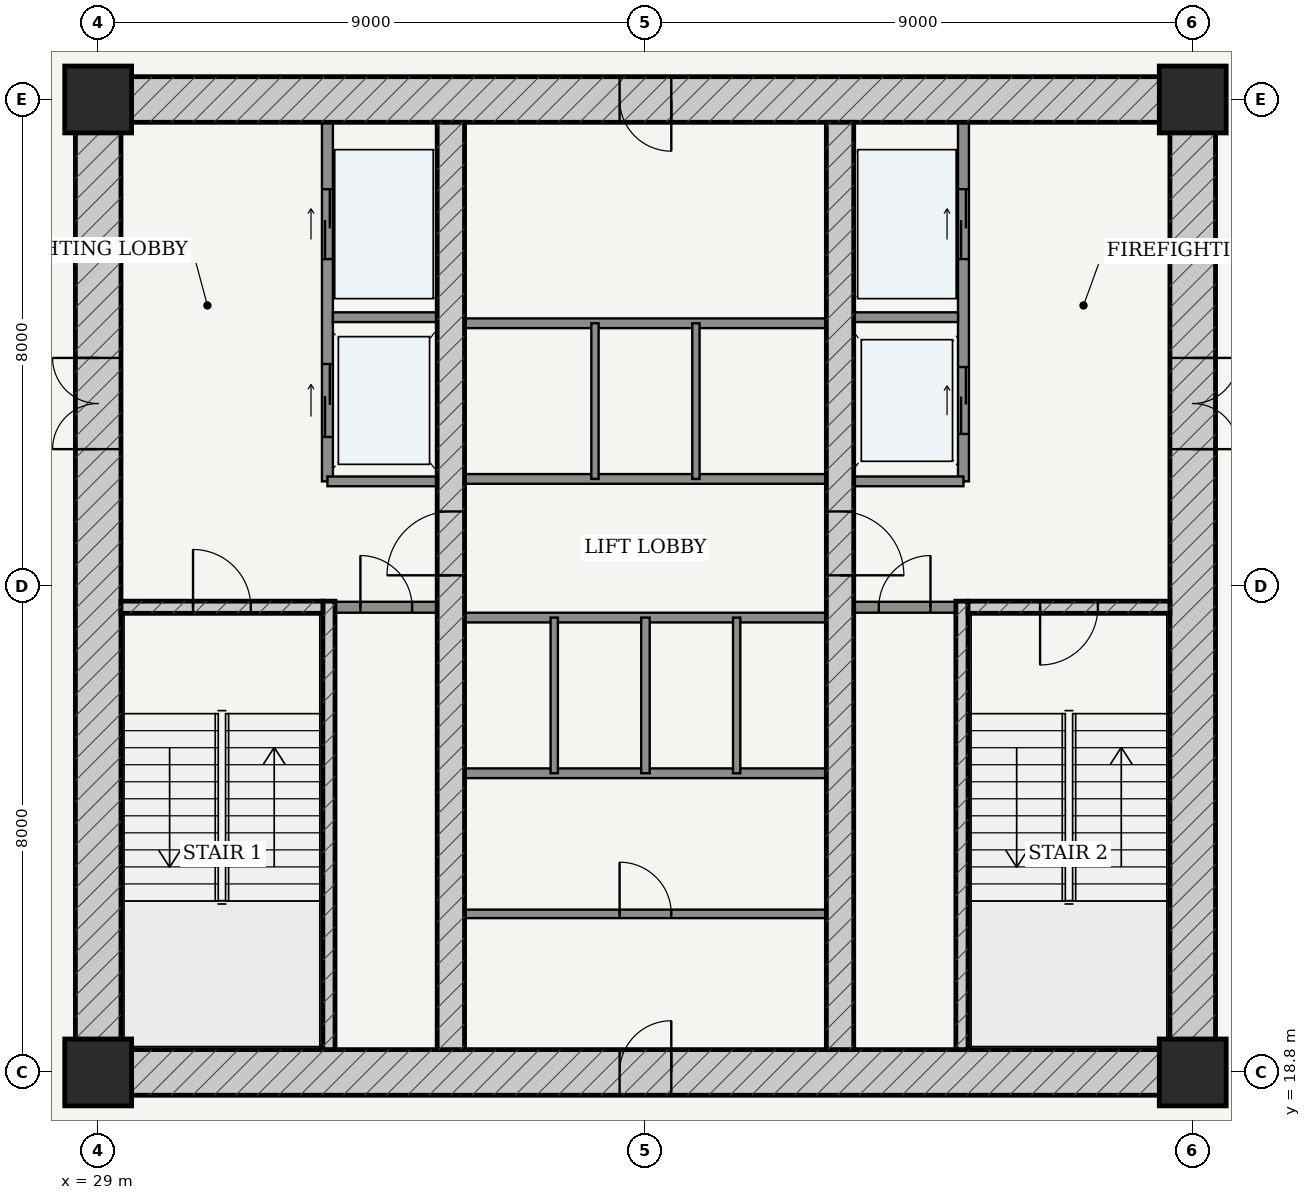
"""IFC4 building model, lengths in metres.
Left out: names, types, materials, properties, quantities, classifications, styles, units other than length and angle.
Written with IfcOpenShell. Run it as: python <this file> out.ifc"""

import sys

from ifc_helpers import new_model, si_unit, direction, frame, frame_2d, origin, origin_2d, place, context, subcontext, project, spatial, rectangle, extrude, source, transform, mapped, element, fill, save


model = new_model("IFC4")
c1 = context("Model", 3, precision=1e-05, world=origin(), true_north=direction((-0.2419218956, 0.970295726276)))
c2 = subcontext(c1, "Body", "Model", "MODEL_VIEW")
j1 = project(units=[si_unit("LENGTHUNIT", "METRE"), si_unit("PLANEANGLEUNIT", "RADIAN")], contexts=[c1])
p1 = place(None, origin())
s1 = spatial("IfcSite", under=j1, at=p1, CompositionType="ELEMENT")
p2 = place(p1, origin())
s2 = spatial("IfcBuilding", under=s1, at=p2, CompositionType="ELEMENT")
p3 = place(p2, frame((0.0, 0.0, -8.4)))
s3 = spatial("IfcBuildingStorey", under=s2, at=p3, CompositionType="ELEMENT", Elevation=-8.4)
for number, where, z_axis, x_axis in (
    (1, (29.0, 18.8, 0.0), (0.0, 0.0, 1.0), (1.0, 0.0, 0.0)),
    (2, (47.0, 18.8, 0.0), (0.0, 0.0, 1.0), (1.0, 0.0, 0.0)),
    (3, (47.0, 34.8, 0.0), (0.0, 0.0, 1.0), (1.0, 0.0, 0.0)),
    (4, (29.0, 34.8, 0.0), (0.0, 0.0, 1.0), (1.0, 0.0, 0.0)),
):
    element("IfcColumn", number, at=place(p3, frame(where, z_axis=z_axis, x_axis=x_axis)), inside=s3, PredefinedType="COLUMN", context=c2, shape_type="SweptSolid", body=[
        extrude(rectangle(XDim=1.1, YDim=1.1, at=origin_2d()), origin(), (0.0, 0.0, 1.0), 4.2),
    ])
p4 = place(p3, frame((28.625, 18.8, 0.0), z_axis=(0.0, 0.0, 1.0), x_axis=(1.0, 0.0, 0.0)))
e5 = element("IfcWall", 5, at=p4, inside=s3, PredefinedType="SHEAR", context=c2, shape_type="SweptSolid", body=[
    extrude(rectangle(XDim=18.75, YDim=0.75, at=frame_2d((9.375, 0.0))), origin(), (0.0, 0.0, 1.0), 3.88),
])
p5 = place(p4, frame((8.95, 0.0, 0.0)))
e6 = element("IfcOpeningElement", 6, at=p5, cuts=e5, PredefinedType="OPENING", context=c2, shape_type="SweptSolid", body=[
    extrude(rectangle(XDim=0.85, YDim=2.1, at=frame_2d((0.425, 1.05))), frame((0.0, 0.385, 0.0), z_axis=(0.0, -1.0, 0.0), x_axis=(1.0, 0.0, 0.0)), (0.0, 0.0, 1.0), 0.77),
])
p6 = place(p3, frame((28.625, 34.8, 0.0), z_axis=(0.0, 0.0, 1.0), x_axis=(1.0, 0.0, 0.0)))
e7 = element("IfcWall", 7, at=p6, inside=s3, PredefinedType="SHEAR", context=c2, shape_type="SweptSolid", body=[
    extrude(rectangle(XDim=18.75, YDim=0.75, at=frame_2d((9.375, 0.0))), origin(), (0.0, 0.0, 1.0), 3.88),
])
p7 = place(p6, frame((8.95, 0.0, 0.0)))
e8 = element("IfcOpeningElement", 8, at=p7, cuts=e7, PredefinedType="OPENING", context=c2, shape_type="SweptSolid", body=[
    extrude(rectangle(XDim=0.85, YDim=2.1, at=frame_2d((0.425, 1.05))), frame((0.0, 0.385, 0.0), z_axis=(0.0, -1.0, 0.0), x_axis=(1.0, 0.0, 0.0)), (0.0, 0.0, 1.0), 0.77),
])
p8 = place(p3, frame((29.0, 19.175, 0.0), z_axis=(0.0, 0.0, 1.0), x_axis=(0.0, 1.0, 0.0)))
e9 = element("IfcWall", 9, at=p8, inside=s3, PredefinedType="SHEAR", context=c2, shape_type="SweptSolid", body=[
    extrude(rectangle(XDim=15.25, YDim=0.75, at=frame_2d((7.625, 0.0))), origin(), (0.0, 0.0, 1.0), 3.88),
])
p9 = place(p8, frame((9.875, 0.0, 0.0)))
e10 = element("IfcOpeningElement", 10, at=p9, cuts=e9, PredefinedType="OPENING", context=c2, shape_type="SweptSolid", body=[
    extrude(rectangle(XDim=1.5, YDim=2.2, at=frame_2d((0.75, 1.1))), frame((0.0, 0.385, 0.0), z_axis=(0.0, -1.0, 0.0), x_axis=(1.0, 0.0, 0.0)), (0.0, 0.0, 1.0), 0.77),
])
p10 = place(p3, frame((47.0, 19.175, 0.0), z_axis=(0.0, 0.0, 1.0), x_axis=(0.0, 1.0, 0.0)))
e11 = element("IfcWall", 11, at=p10, inside=s3, PredefinedType="SHEAR", context=c2, shape_type="SweptSolid", body=[
    extrude(rectangle(XDim=15.25, YDim=0.75, at=frame_2d((7.625, 0.0))), origin(), (0.0, 0.0, 1.0), 3.88),
])
p11 = place(p10, frame((9.875, 0.0, 0.0)))
e12 = element("IfcOpeningElement", 12, at=p11, cuts=e11, PredefinedType="OPENING", context=c2, shape_type="SweptSolid", body=[
    extrude(rectangle(XDim=1.5, YDim=2.2, at=frame_2d((0.75, 1.1))), frame((0.0, 0.385, 0.0), z_axis=(0.0, -1.0, 0.0), x_axis=(1.0, 0.0, 0.0)), (0.0, 0.0, 1.0), 0.77),
])
p12 = place(p3, frame((32.795, 19.175, 0.0), z_axis=(0.0, 0.0, 1.0), x_axis=(0.0, 1.0, 0.0)))
e13 = element("IfcWall", 13, at=p12, inside=s3, PredefinedType="SOLIDWALL", context=c2, shape_type="SweptSolid", body=[
    extrude(rectangle(XDim=7.375, YDim=0.2, at=frame_2d((3.688, 0.0))), origin(), (0.0, 0.0, 1.0), 3.88),
])
p13 = place(p3, frame((29.375, 26.45, 0.0), z_axis=(0.0, 0.0, 1.0), x_axis=(1.0, 0.0, 0.0)))
e14 = element("IfcWall", 14, at=p13, inside=s3, PredefinedType="SOLIDWALL", context=c2, shape_type="SweptSolid", body=[
    extrude(rectangle(XDim=3.32, YDim=0.2, at=frame_2d((1.66, 0.0))), origin(), (0.0, 0.0, 1.0), 3.88),
])
p14 = place(p13, frame((1.185, 0.0, 0.0)))
e15 = element("IfcOpeningElement", 15, at=p14, cuts=e14, PredefinedType="OPENING", context=c2, shape_type="SweptSolid", body=[
    extrude(rectangle(XDim=0.95, YDim=2.15, at=frame_2d((0.475, 1.075))), frame((0.0, 0.11, 0.0), z_axis=(0.0, -1.0, 0.0), x_axis=(1.0, 0.0, 0.0)), (0.0, 0.0, 1.0), 0.22),
])
p15 = place(p3, frame((43.205, 19.175, 0.0), z_axis=(0.0, 0.0, 1.0), x_axis=(0.0, 1.0, 0.0)))
e16 = element("IfcWall", 16, at=p15, inside=s3, PredefinedType="SOLIDWALL", context=c2, shape_type="SweptSolid", body=[
    extrude(rectangle(XDim=7.375, YDim=0.2, at=frame_2d((3.688, 0.0))), origin(), (0.0, 0.0, 1.0), 3.88),
])
p16 = place(p3, frame((43.305, 26.45, 0.0), z_axis=(0.0, 0.0, 1.0), x_axis=(1.0, 0.0, 0.0)))
e17 = element("IfcWall", 17, at=p16, inside=s3, PredefinedType="SOLIDWALL", context=c2, shape_type="SweptSolid", body=[
    extrude(rectangle(XDim=3.32, YDim=0.2, at=frame_2d((1.66, 0.0))), origin(), (0.0, 0.0, 1.0), 3.88),
])
p17 = place(p16, frame((1.185, 0.0, 0.0)))
e18 = element("IfcOpeningElement", 18, at=p17, cuts=e17, PredefinedType="OPENING", context=c2, shape_type="SweptSolid", body=[
    extrude(rectangle(XDim=0.95, YDim=2.15, at=frame_2d((0.475, 1.075))), frame((0.0, 0.11, 0.0), z_axis=(0.0, -1.0, 0.0), x_axis=(1.0, 0.0, 0.0)), (0.0, 0.0, 1.0), 0.22),
])
p18 = place(p3, frame((34.8, 19.175, 0.0), z_axis=(0.0, 0.0, 1.0), x_axis=(0.0, 1.0, 0.0)))
e19 = element("IfcWall", 19, at=p18, inside=s3, PredefinedType="SHEAR", context=c2, shape_type="SweptSolid", body=[
    extrude(rectangle(XDim=15.25, YDim=0.45, at=frame_2d((7.625, 0.0))), origin(), (0.0, 0.0, 1.0), 3.88),
])
p19 = place(p18, frame((7.8, 0.0, 0.0)))
e20 = element("IfcOpeningElement", 20, at=p19, cuts=e19, PredefinedType="OPENING", context=c2, shape_type="SweptSolid", body=[
    extrude(rectangle(XDim=1.05, YDim=2.15, at=frame_2d((0.525, 1.075))), frame((0.0, 0.235, 0.0), z_axis=(0.0, -1.0, 0.0), x_axis=(1.0, 0.0, 0.0)), (0.0, 0.0, 1.0), 0.47),
])
p20 = place(p3, frame((41.2, 19.175, 0.0), z_axis=(0.0, 0.0, 1.0), x_axis=(0.0, 1.0, 0.0)))
e21 = element("IfcWall", 21, at=p20, inside=s3, PredefinedType="SHEAR", context=c2, shape_type="SweptSolid", body=[
    extrude(rectangle(XDim=15.25, YDim=0.45, at=frame_2d((7.625, 0.0))), origin(), (0.0, 0.0, 1.0), 3.88),
])
p21 = place(p20, frame((7.8, 0.0, 0.0)))
e22 = element("IfcOpeningElement", 22, at=p21, cuts=e21, PredefinedType="OPENING", context=c2, shape_type="SweptSolid", body=[
    extrude(rectangle(XDim=1.05, YDim=2.15, at=frame_2d((0.525, 1.075))), frame((0.0, 0.235, 0.0), z_axis=(0.0, -1.0, 0.0), x_axis=(1.0, 0.0, 0.0)), (0.0, 0.0, 1.0), 0.47),
])
p22 = place(p3, frame((32.9, 26.45, 0.0), z_axis=(0.0, 0.0, 1.0), x_axis=(1.0, 0.0, 0.0)))
e23 = element("IfcWall", 23, at=p22, inside=s3, PredefinedType="PARTITIONING", context=c2, shape_type="SweptSolid", body=[
    extrude(rectangle(XDim=1.675, YDim=0.18, at=frame_2d((0.837, 0.0))), origin(), (0.0, 0.0, 1.0), 3.88),
])
p23 = place(p22, frame((0.413, 0.0, 0.0)))
e24 = element("IfcOpeningElement", 24, at=p23, cuts=e23, PredefinedType="OPENING", context=c2, shape_type="SweptSolid", body=[
    extrude(rectangle(XDim=0.85, YDim=2.1, at=frame_2d((0.425, 1.05))), frame((0.0, 0.1, 0.0), z_axis=(0.0, -1.0, 0.0), x_axis=(1.0, 0.0, 0.0)), (0.0, 0.0, 1.0), 0.2),
])
p24 = place(p3, frame((41.425, 26.45, 0.0), z_axis=(0.0, 0.0, 1.0), x_axis=(1.0, 0.0, 0.0)))
e25 = element("IfcWall", 25, at=p24, inside=s3, PredefinedType="PARTITIONING", context=c2, shape_type="SweptSolid", body=[
    extrude(rectangle(XDim=1.675, YDim=0.18, at=frame_2d((0.837, 0.0))), origin(), (0.0, 0.0, 1.0), 3.88),
])
p25 = place(p24, frame((0.413, 0.0, 0.0)))
e26 = element("IfcOpeningElement", 26, at=p25, cuts=e25, PredefinedType="OPENING", context=c2, shape_type="SweptSolid", body=[
    extrude(rectangle(XDim=0.85, YDim=2.1, at=frame_2d((0.425, 1.05))), frame((0.0, 0.1, 0.0), z_axis=(0.0, -1.0, 0.0), x_axis=(1.0, 0.0, 0.0)), (0.0, 0.0, 1.0), 0.2),
])
p26 = place(p3, frame((32.77, 28.52, 0.0), z_axis=(0.0, 0.0, 1.0), x_axis=(0.0, 1.0, 0.0)))
e27 = element("IfcWall", 27, at=p26, inside=s3, PredefinedType="PARTITIONING", context=c2, shape_type="SweptSolid", body=[
    extrude(rectangle(XDim=5.905, YDim=0.18, at=frame_2d((2.953, 0.0))), origin(), (0.0, 0.0, 1.0), 3.88),
])
p27 = place(p26, frame((3.655, 0.0, 0.0)))
e28 = element("IfcOpeningElement", 28, at=p27, cuts=e27, PredefinedType="OPENING", context=c2, shape_type="SweptSolid", body=[
    extrude(rectangle(XDim=1.15, YDim=2.2, at=frame_2d((0.575, 1.1))), frame((0.0, 0.1, 0.0), z_axis=(0.0, -1.0, 0.0), x_axis=(1.0, 0.0, 0.0)), (0.0, 0.0, 1.0), 0.2),
])
p28 = place(p26, frame((0.73, 0.0, 0.0)))
e29 = element("IfcOpeningElement", 29, at=p28, cuts=e27, PredefinedType="OPENING", context=c2, shape_type="SweptSolid", body=[
    extrude(rectangle(XDim=1.2, YDim=2.25, at=frame_2d((0.6, 1.125))), frame((0.0, 0.1, 0.0), z_axis=(0.0, -1.0, 0.0), x_axis=(1.0, 0.0, 0.0)), (0.0, 0.0, 1.0), 0.2),
])
p29 = place(p3, frame((32.86, 31.22, 0.0), z_axis=(0.0, 0.0, 1.0), x_axis=(1.0, 0.0, 0.0)))
e30 = element("IfcWall", 30, at=p29, inside=s3, PredefinedType="PARTITIONING", context=c2, shape_type="SweptSolid", body=[
    extrude(rectangle(XDim=1.715, YDim=0.16, at=frame_2d((0.857, 0.0))), origin(), (0.0, 0.0, 1.0), 3.88),
])
p30 = place(p3, frame((32.77, 28.52, 0.0), z_axis=(0.0, 0.0, 1.0), x_axis=(1.0, 0.0, 0.0)))
e31 = element("IfcWall", 31, at=p30, inside=s3, PredefinedType="PARTITIONING", context=c2, shape_type="SweptSolid", body=[
    extrude(rectangle(XDim=1.805, YDim=0.16, at=frame_2d((0.902, 0.0))), origin(), (0.0, 0.0, 1.0), 3.88),
])
p31 = place(p3, frame((43.23, 28.52, 0.0), z_axis=(0.0, 0.0, 1.0), x_axis=(0.0, 1.0, 0.0)))
e32 = element("IfcWall", 32, at=p31, inside=s3, PredefinedType="PARTITIONING", context=c2, shape_type="SweptSolid", body=[
    extrude(rectangle(XDim=5.905, YDim=0.18, at=frame_2d((2.953, 0.0))), origin(), (0.0, 0.0, 1.0), 3.88),
])
p32 = place(p31, frame((3.655, 0.0, 0.0)))
e33 = element("IfcOpeningElement", 33, at=p32, cuts=e32, PredefinedType="OPENING", context=c2, shape_type="SweptSolid", body=[
    extrude(rectangle(XDim=1.15, YDim=2.2, at=frame_2d((0.575, 1.1))), frame((0.0, 0.1, 0.0), z_axis=(0.0, -1.0, 0.0), x_axis=(1.0, 0.0, 0.0)), (0.0, 0.0, 1.0), 0.2),
])
p33 = place(p31, frame((0.78, 0.0, 0.0)))
e34 = element("IfcOpeningElement", 34, at=p33, cuts=e32, PredefinedType="OPENING", context=c2, shape_type="SweptSolid", body=[
    extrude(rectangle(XDim=1.1, YDim=2.2, at=frame_2d((0.55, 1.1))), frame((0.0, 0.1, 0.0), z_axis=(0.0, -1.0, 0.0), x_axis=(1.0, 0.0, 0.0)), (0.0, 0.0, 1.0), 0.2),
])
p34 = place(p3, frame((41.425, 31.22, 0.0), z_axis=(0.0, 0.0, 1.0), x_axis=(1.0, 0.0, 0.0)))
e35 = element("IfcWall", 35, at=p34, inside=s3, PredefinedType="PARTITIONING", context=c2, shape_type="SweptSolid", body=[
    extrude(rectangle(XDim=1.715, YDim=0.16, at=frame_2d((0.857, 0.0))), origin(), (0.0, 0.0, 1.0), 3.88),
])
p35 = place(p3, frame((41.425, 28.52, 0.0), z_axis=(0.0, 0.0, 1.0), x_axis=(1.0, 0.0, 0.0)))
e36 = element("IfcWall", 36, at=p35, inside=s3, PredefinedType="PARTITIONING", context=c2, shape_type="SweptSolid", body=[
    extrude(rectangle(XDim=1.805, YDim=0.16, at=frame_2d((0.902, 0.0))), origin(), (0.0, 0.0, 1.0), 3.88),
])
for number, where, z_axis, x_axis in (
    (37, (35.025, 28.56, 0.0), (0.0, 0.0, 1.0), (1.0, 0.0, 0.0)),
    (38, (35.025, 31.12, 0.0), (0.0, 0.0, 1.0), (1.0, 0.0, 0.0)),
):
    element("IfcWall", number, at=place(p3, frame(where, z_axis=z_axis, x_axis=x_axis)), inside=s3, PredefinedType="PARTITIONING", context=c2, shape_type="SweptSolid", body=[
        extrude(rectangle(XDim=5.95, YDim=0.16, at=frame_2d((2.975, 0.0))), origin(), (0.0, 0.0, 1.0), 3.88),
    ])
for number, where, z_axis, x_axis in (
    (39, (37.17, 28.56, 0.0), (0.0, 0.0, 1.0), (0.0, 1.0, 0.0)),
    (40, (38.83, 28.56, 0.0), (0.0, 0.0, 1.0), (0.0, 1.0, 0.0)),
):
    element("IfcWall", number, at=place(p3, frame(where, z_axis=z_axis, x_axis=x_axis)), inside=s3, PredefinedType="PARTITIONING", context=c2, shape_type="SweptSolid", body=[
        extrude(rectangle(XDim=2.56, YDim=0.12, at=frame_2d((1.28, 0.0))), origin(), (0.0, 0.0, 1.0), 3.88),
    ])
for number, where, z_axis, x_axis in (
    (41, (35.025, 26.28, 0.0), (0.0, 0.0, 1.0), (1.0, 0.0, 0.0)),
    (42, (35.025, 23.72, 0.0), (0.0, 0.0, 1.0), (1.0, 0.0, 0.0)),
):
    element("IfcWall", number, at=place(p3, frame(where, z_axis=z_axis, x_axis=x_axis)), inside=s3, PredefinedType="PARTITIONING", context=c2, shape_type="SweptSolid", body=[
        extrude(rectangle(XDim=5.95, YDim=0.16, at=frame_2d((2.975, 0.0))), origin(), (0.0, 0.0, 1.0), 3.88),
    ])
p36 = place(p3, frame((36.5, 23.72, 0.0), z_axis=(0.0, 0.0, 1.0), x_axis=(0.0, 1.0, 0.0)))
e43 = element("IfcWall", 43, at=p36, inside=s3, PredefinedType="PARTITIONING", context=c2, shape_type="SweptSolid", body=[
    extrude(rectangle(XDim=2.56, YDim=0.12, at=frame_2d((1.28, 0.0))), origin(), (0.0, 0.0, 1.0), 3.88),
])
p37 = place(p3, frame((38.0, 23.72, 0.0), z_axis=(0.0, 0.0, 1.0), x_axis=(0.0, 1.0, 0.0)))
e44 = element("IfcWall", 44, at=p37, inside=s3, PredefinedType="PARTITIONING", context=c2, shape_type="SweptSolid", body=[
    extrude(rectangle(XDim=2.56, YDim=0.14, at=frame_2d((1.28, 0.0))), origin(), (0.0, 0.0, 1.0), 3.88),
])
p38 = place(p3, frame((39.5, 23.72, 0.0), z_axis=(0.0, 0.0, 1.0), x_axis=(0.0, 1.0, 0.0)))
e45 = element("IfcWall", 45, at=p38, inside=s3, PredefinedType="PARTITIONING", context=c2, shape_type="SweptSolid", body=[
    extrude(rectangle(XDim=2.56, YDim=0.12, at=frame_2d((1.28, 0.0))), origin(), (0.0, 0.0, 1.0), 3.88),
])
p39 = place(p3, frame((35.025, 21.407, 0.0), z_axis=(0.0, 0.0, 1.0), x_axis=(1.0, 0.0, 0.0)))
e46 = element("IfcWall", 46, at=p39, inside=s3, PredefinedType="PARTITIONING", context=c2, shape_type="SweptSolid", body=[
    extrude(rectangle(XDim=5.95, YDim=0.14, at=frame_2d((2.975, 0.0))), origin(), (0.0, 0.0, 1.0), 3.88),
])
p40 = place(p39, frame((2.55, 0.0, 0.0)))
e47 = element("IfcOpeningElement", 47, at=p40, cuts=e46, PredefinedType="OPENING", context=c2, shape_type="SweptSolid", body=[
    extrude(rectangle(XDim=0.85, YDim=2.1, at=frame_2d((0.425, 1.05))), frame((0.0, 0.08, 0.0), z_axis=(0.0, -1.0, 0.0), x_axis=(1.0, 0.0, 0.0)), (0.0, 0.0, 1.0), 0.16),
])
m1 = source(origin(), c2, "Body", "SweptSolid", [
    extrude(rectangle(XDim=1.5, YDim=2.2, at=frame_2d((0.75, 1.1))), frame((0.0, 0.025, 0.0), z_axis=(0.0, -1.0, 0.0), x_axis=(1.0, 0.0, 0.0)), (0.0, 0.0, 1.0), 0.05),
])
p41 = place(p9, origin())
e48 = element("IfcDoor", 48, at=p41, inside=s3, OperationType="DOUBLE_DOOR_SINGLE_SWING", PredefinedType="DOOR", context=c2, shape_type="MappedRepresentation", body=[
    mapped(m1, transform((0.0, 0.0, 0.0), scale=1.0)),
])
fill(e10, e48)
p42 = place(p11, frame((1.5, 0.0, 0.0), z_axis=(0.0, 0.0, 1.0), x_axis=(-1.0, 0.0, 0.0)))
e49 = element("IfcDoor", 49, at=p42, inside=s3, OperationType="DOUBLE_DOOR_SINGLE_SWING", PredefinedType="DOOR", context=c2, shape_type="MappedRepresentation", body=[
    mapped(m1, transform((0.0, 0.0, 0.0), scale=1.0)),
])
fill(e12, e49)
m2 = source(origin(), c2, "Body", "SweptSolid", [
    extrude(rectangle(XDim=1.05, YDim=2.15, at=frame_2d((0.525, 1.075))), frame((0.0, 0.025, 0.0), z_axis=(0.0, -1.0, 0.0), x_axis=(1.0, 0.0, 0.0)), (0.0, 0.0, 1.0), 0.05),
])
p43 = place(p19, origin())
e50 = element("IfcDoor", 50, at=p43, inside=s3, OperationType="SINGLE_SWING_LEFT", PredefinedType="DOOR", context=c2, shape_type="MappedRepresentation", body=[
    mapped(m2, transform((0.0, 0.0, 0.0), scale=1.0)),
])
fill(e20, e50)
p44 = place(p21, frame((1.05, 0.0, 0.0), z_axis=(0.0, 0.0, 1.0), x_axis=(-1.0, 0.0, 0.0)))
e51 = element("IfcDoor", 51, at=p44, inside=s3, OperationType="SINGLE_SWING_RIGHT", PredefinedType="DOOR", context=c2, shape_type="MappedRepresentation", body=[
    mapped(m2, transform((0.0, 0.0, 0.0), scale=1.0)),
])
fill(e22, e51)
m3 = source(origin(), c2, "Body", "SweptSolid", [
    extrude(rectangle(XDim=0.95, YDim=2.15, at=frame_2d((0.475, 1.075))), frame((0.0, 0.025, 0.0), z_axis=(0.0, -1.0, 0.0), x_axis=(1.0, 0.0, 0.0)), (0.0, 0.0, 1.0), 0.05),
])
p45 = place(p14, origin())
e52 = element("IfcDoor", 52, at=p45, inside=s3, OperationType="SINGLE_SWING_LEFT", PredefinedType="DOOR", context=c2, shape_type="MappedRepresentation", body=[
    mapped(m3, transform((0.0, 0.0, 0.0), scale=1.0)),
])
fill(e15, e52)
p46 = place(p17, frame((0.95, 0.0, 0.0), z_axis=(0.0, 0.0, 1.0), x_axis=(-1.0, 0.0, 0.0)))
e53 = element("IfcDoor", 53, at=p46, inside=s3, OperationType="SINGLE_SWING_RIGHT", PredefinedType="DOOR", context=c2, shape_type="MappedRepresentation", body=[
    mapped(m3, transform((0.0, 0.0, 0.0), scale=1.0)),
])
fill(e18, e53)
m4 = source(origin(), c2, "Body", "SweptSolid", [
    extrude(rectangle(XDim=0.85, YDim=2.1, at=frame_2d((0.425, 1.05))), frame((0.0, 0.025, 0.0), z_axis=(0.0, -1.0, 0.0), x_axis=(1.0, 0.0, 0.0)), (0.0, 0.0, 1.0), 0.05),
])
p47 = place(p23, origin())
e54 = element("IfcDoor", 54, at=p47, inside=s3, OperationType="SINGLE_SWING_LEFT", PredefinedType="DOOR", context=c2, shape_type="MappedRepresentation", body=[
    mapped(m4, transform((0.0, 0.0, 0.0), scale=1.0)),
])
fill(e24, e54)
p48 = place(p25, origin())
e55 = element("IfcDoor", 55, at=p48, inside=s3, OperationType="SINGLE_SWING_RIGHT", PredefinedType="DOOR", context=c2, shape_type="MappedRepresentation", body=[
    mapped(m4, transform((0.0, 0.0, 0.0), scale=1.0)),
])
fill(e26, e55)
p49 = place(p7, frame((0.85, 0.0, 0.0), z_axis=(0.0, 0.0, 1.0), x_axis=(-1.0, 0.0, 0.0)))
e56 = element("IfcDoor", 56, at=p49, inside=s3, OperationType="SINGLE_SWING_LEFT", PredefinedType="DOOR", context=c2, shape_type="MappedRepresentation", body=[
    mapped(m4, transform((0.0, 0.0, 0.0), scale=1.0)),
])
fill(e8, e56)
p50 = place(p5, origin())
e57 = element("IfcDoor", 57, at=p50, inside=s3, OperationType="SINGLE_SWING_RIGHT", PredefinedType="DOOR", context=c2, shape_type="MappedRepresentation", body=[
    mapped(m4, transform((0.0, 0.0, 0.0), scale=1.0)),
])
fill(e6, e57)
p51 = place(p40, origin())
e58 = element("IfcDoor", 58, at=p51, inside=s3, OperationType="SINGLE_SWING_LEFT", PredefinedType="DOOR", context=c2, shape_type="MappedRepresentation", body=[
    mapped(m4, transform((0.0, 0.0, 0.0), scale=1.0)),
])
fill(e47, e58)
m5 = source(origin(), c2, "Body", "SweptSolid", [
    extrude(rectangle(XDim=1.15, YDim=2.2, at=frame_2d((0.575, 1.1))), frame((0.0, 0.025, 0.0), z_axis=(0.0, -1.0, 0.0), x_axis=(1.0, 0.0, 0.0)), (0.0, 0.0, 1.0), 0.05),
])
p52 = place(p27, origin())
e59 = element("IfcDoor", 59, at=p52, inside=s3, OperationType="DOUBLE_DOOR_SLIDING", PredefinedType="DOOR", context=c2, shape_type="MappedRepresentation", body=[
    mapped(m5, transform((0.0, 0.0, 0.0), scale=1.0)),
])
fill(e28, e59)
p53 = place(p32, origin())
e60 = element("IfcDoor", 60, at=p53, inside=s3, OperationType="DOUBLE_DOOR_SLIDING", PredefinedType="DOOR", context=c2, shape_type="MappedRepresentation", body=[
    mapped(m5, transform((0.0, 0.0, 0.0), scale=1.0)),
])
fill(e33, e60)
m6 = source(origin(), c2, "Body", "SweptSolid", [
    extrude(rectangle(XDim=1.2, YDim=2.25, at=frame_2d((0.6, 1.125))), frame((0.0, 0.025, 0.0), z_axis=(0.0, -1.0, 0.0), x_axis=(1.0, 0.0, 0.0)), (0.0, 0.0, 1.0), 0.05),
])
p54 = place(p28, origin())
e61 = element("IfcDoor", 61, at=p54, inside=s3, OperationType="DOUBLE_DOOR_SLIDING", PredefinedType="DOOR", context=c2, shape_type="MappedRepresentation", body=[
    mapped(m6, transform((0.0, 0.0, 0.0), scale=1.0)),
])
fill(e29, e61)
m7 = source(origin(), c2, "Body", "SweptSolid", [
    extrude(rectangle(XDim=1.1, YDim=2.2, at=frame_2d((0.55, 1.1))), frame((0.0, 0.025, 0.0), z_axis=(0.0, -1.0, 0.0), x_axis=(1.0, 0.0, 0.0)), (0.0, 0.0, 1.0), 0.05),
])
p55 = place(p33, origin())
e62 = element("IfcDoor", 62, at=p55, inside=s3, OperationType="DOUBLE_DOOR_SLIDING", PredefinedType="DOOR", context=c2, shape_type="MappedRepresentation", body=[
    mapped(m7, transform((0.0, 0.0, 0.0), scale=1.0)),
])
fill(e34, e62)
save(model, sys.argv[1])
